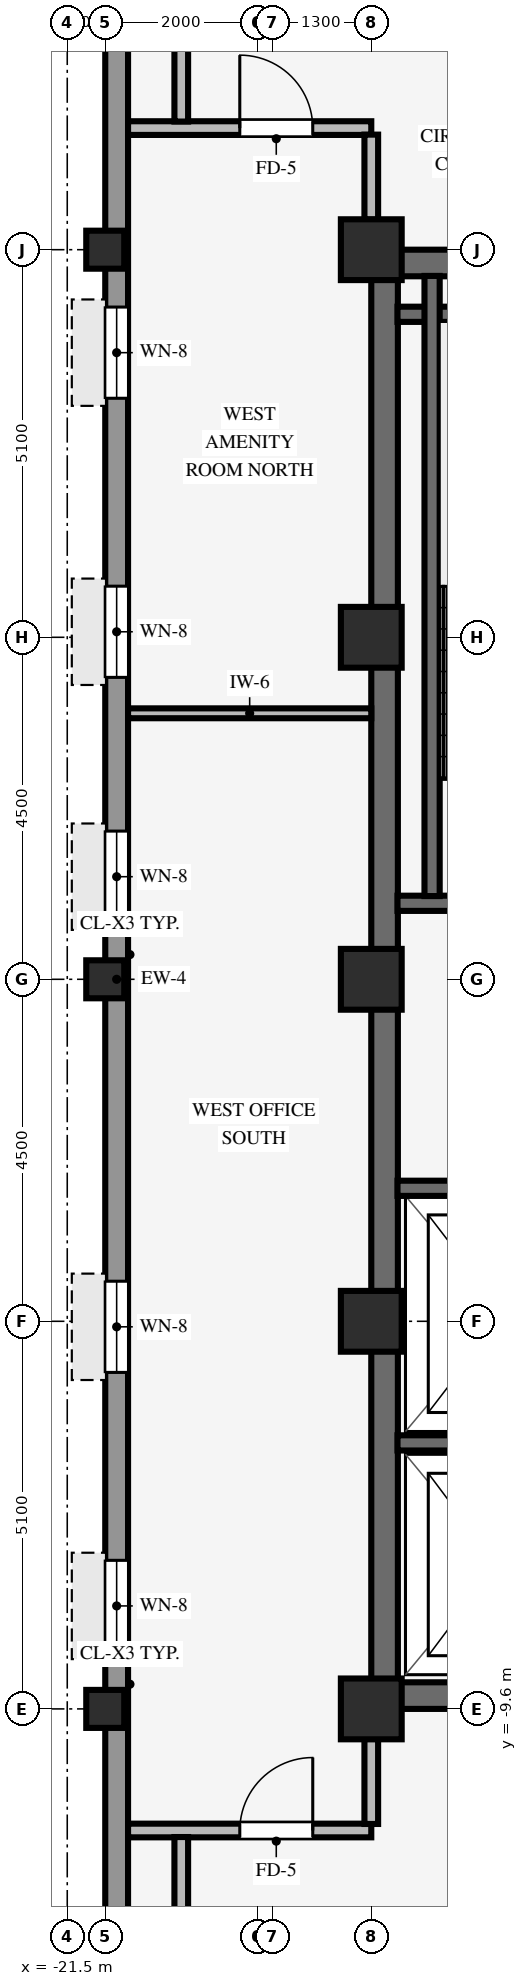
"""IFC4 building model, lengths in metres.
Left out: names, types, materials, properties, quantities, classifications, styles, units other than length and angle.
Written with IfcOpenShell. Run it as: python <this file> out.ifc"""

import sys

from ifc_helpers import new_model, si_unit, direction, frame, frame_2d, origin, origin_2d, place, context, subcontext, project, spatial, rectangle, hollow_rectangle, extrude, source, transform, mapped, element, fill, save


model = new_model("IFC4")
c1 = context("Model", 3, precision=1e-05, world=origin(), true_north=direction((0.0, 1.0)))
c2 = subcontext(c1, "Body", "Model", "MODEL_VIEW")
j1 = project(units=[si_unit("LENGTHUNIT", "METRE"), si_unit("PLANEANGLEUNIT", "RADIAN")], contexts=[c1])
p1 = place(None, origin())
s1 = spatial("IfcSite", under=j1, at=p1, CompositionType="ELEMENT")
p2 = place(p1, origin())
s2 = spatial("IfcBuilding", under=s1, at=p2, CompositionType="ELEMENT")
p3 = place(p2, frame((0.0, 0.0, 261.6)))
s3 = spatial("IfcBuildingStorey", under=s2, at=p3, CompositionType="ELEMENT", Elevation=261.6)
for number, where, z_axis, x_axis in (
    (1, (-17.5, -9.425, 0.0), (0.0, 0.0, 1.0), (1.0, 0.0, 0.0)),
    (2, (-17.5, 9.425, 0.0), (0.0, 0.0, 1.0), (1.0, 0.0, 0.0)),
):
    element("IfcWall", number, at=place(p3, frame(where, z_axis=z_axis, x_axis=x_axis)), inside=s3, PredefinedType="SHEAR", context=c2, shape_type="SweptSolid", body=[
        extrude(rectangle(XDim=8.5, YDim=0.35, at=frame_2d((4.25, 0.0))), origin(), (0.0, 0.0, 1.0), 3.37),
    ])
p4 = place(p3, frame((-17.325, -9.255, 0.0), z_axis=(0.0, 0.0, 1.0), x_axis=(0.0, 1.0, 0.0)))
e3 = element("IfcWall", 3, at=p4, inside=s3, PredefinedType="SHEAR", context=c2, shape_type="SweptSolid", body=[
    extrude(rectangle(XDim=18.51, YDim=0.35, at=frame_2d((9.255, 0.0))), origin(), (0.0, 0.0, 1.0), 3.37),
])
for number, where, z_axis, x_axis in (
    (4, (-17.5, -9.6, 0.0), (0.0, 0.0, 1.0), (1.0, 0.0, 0.0)),
    (5, (-17.5, -4.5, 0.0), (0.0, 0.0, 1.0), (1.0, 0.0, 0.0)),
    (6, (-17.5, 4.5, 0.0), (0.0, 0.0, 1.0), (1.0, 0.0, 0.0)),
    (7, (-17.5, 9.6, 0.0), (0.0, 0.0, 1.0), (1.0, 0.0, 0.0)),
    (8, (-17.5, 0.0, 0.0), (0.0, 0.0, 1.0), (1.0, 0.0, 0.0)),
):
    element("IfcColumn", number, at=place(p3, frame(where, z_axis=z_axis, x_axis=x_axis)), inside=s3, PredefinedType="COLUMN", context=c2, shape_type="SweptSolid", body=[
        extrude(rectangle(XDim=0.8, YDim=0.8, at=origin_2d()), origin(), (0.0, 0.0, 1.0), 3.37),
    ])
for number, where, z_axis, x_axis in (
    (9, (-21.0, -9.6, 0.0), (0.0, 0.0, 1.0), (1.0, 0.0, 0.0)),
    (10, (-21.0, 0.0, 0.0), (0.0, 0.0, 1.0), (1.0, 0.0, 0.0)),
    (11, (-21.0, 9.6, 0.0), (0.0, 0.0, 1.0), (1.0, 0.0, 0.0)),
):
    element("IfcColumn", number, at=place(p3, frame(where, z_axis=z_axis, x_axis=x_axis)), inside=s3, PredefinedType="COLUMN", context=c2, shape_type="SweptSolid", body=[
        extrude(hollow_rectangle(XDim=0.5, YDim=0.5, WallThickness=0.032, InnerFilletRadius=0.032, OuterFilletRadius=0.064, at=origin_2d()), origin(), (0.0, 0.0, 1.0), 3.37),
    ])
p5 = place(p3, frame((-20.85, -17.004, 0.0), z_axis=(0.0, 0.0, 1.0), x_axis=(0.0, 1.0, 0.0)))
e12 = element("IfcWall", 12, at=p5, inside=s3, PredefinedType="STANDARD", context=c2, shape_type="SweptSolid", body=[
    extrude(rectangle(XDim=34.008, YDim=0.3, at=frame_2d((17.004, 0.0))), origin(), (0.0, 0.0, 1.0), 2.705),
])
p6 = place(p5, frame((1.786, 0.0, 0.8)))
e13 = element("IfcOpeningElement", 13, at=p6, cuts=e12, PredefinedType="OPENING", context=c2, shape_type="SweptSolid", body=[
    extrude(rectangle(XDim=1.2, YDim=1.48, at=frame_2d((0.6, 0.74))), frame((0.0, 0.16, 0.0), z_axis=(0.0, -1.0, 0.0), x_axis=(1.0, 0.0, 0.0)), (0.0, 0.0, 1.0), 0.32),
])
p7 = place(p5, frame((8.159, 0.0, 0.8)))
e14 = element("IfcOpeningElement", 14, at=p7, cuts=e12, PredefinedType="OPENING", context=c2, shape_type="SweptSolid", body=[
    extrude(rectangle(XDim=1.2, YDim=1.48, at=frame_2d((0.6, 0.74))), frame((0.0, 0.16, 0.0), z_axis=(0.0, -1.0, 0.0), x_axis=(1.0, 0.0, 0.0)), (0.0, 0.0, 1.0), 0.32),
])
p8 = place(p5, frame((11.831, 0.0, 0.8)))
e15 = element("IfcOpeningElement", 15, at=p8, cuts=e12, PredefinedType="OPENING", context=c2, shape_type="SweptSolid", body=[
    extrude(rectangle(XDim=1.2, YDim=1.48, at=frame_2d((0.6, 0.74))), frame((0.0, 0.16, 0.0), z_axis=(0.0, -1.0, 0.0), x_axis=(1.0, 0.0, 0.0)), (0.0, 0.0, 1.0), 0.32),
])
p9 = place(p5, frame((17.754, 0.0, 0.8)))
e16 = element("IfcOpeningElement", 16, at=p9, cuts=e12, PredefinedType="OPENING", context=c2, shape_type="SweptSolid", body=[
    extrude(rectangle(XDim=1.2, YDim=1.48, at=frame_2d((0.6, 0.74))), frame((0.0, 0.16, 0.0), z_axis=(0.0, -1.0, 0.0), x_axis=(1.0, 0.0, 0.0)), (0.0, 0.0, 1.0), 0.32),
])
p10 = place(p5, frame((20.977, 0.0, 0.8)))
e17 = element("IfcOpeningElement", 17, at=p10, cuts=e12, PredefinedType="OPENING", context=c2, shape_type="SweptSolid", body=[
    extrude(rectangle(XDim=1.2, YDim=1.48, at=frame_2d((0.6, 0.74))), frame((0.0, 0.16, 0.0), z_axis=(0.0, -1.0, 0.0), x_axis=(1.0, 0.0, 0.0)), (0.0, 0.0, 1.0), 0.32),
])
p11 = place(p5, frame((24.649, 0.0, 0.8)))
e18 = element("IfcOpeningElement", 18, at=p11, cuts=e12, PredefinedType="OPENING", context=c2, shape_type="SweptSolid", body=[
    extrude(rectangle(XDim=1.2, YDim=1.48, at=frame_2d((0.6, 0.74))), frame((0.0, 0.16, 0.0), z_axis=(0.0, -1.0, 0.0), x_axis=(1.0, 0.0, 0.0)), (0.0, 0.0, 1.0), 0.32),
])
p12 = place(p5, frame((31.022, 0.0, 0.8)))
e19 = element("IfcOpeningElement", 19, at=p12, cuts=e12, PredefinedType="OPENING", context=c2, shape_type="SweptSolid", body=[
    extrude(rectangle(XDim=1.2, YDim=1.48, at=frame_2d((0.6, 0.74))), frame((0.0, 0.16, 0.0), z_axis=(0.0, -1.0, 0.0), x_axis=(1.0, 0.0, 0.0)), (0.0, 0.0, 1.0), 0.32),
])
for number, where, z_axis, x_axis in (
    (20, (-17.155, 1.0, 0.0), (0.0, 0.0, 1.0), (1.0, 0.0, 0.0)),
    (21, (-17.155, 8.75, 0.0), (0.0, 0.0, 1.0), (1.0, 0.0, 0.0)),
):
    element("IfcWall", number, at=place(p3, frame(where, z_axis=z_axis, x_axis=x_axis)), inside=s3, PredefinedType="SHEAR", context=c2, shape_type="SweptSolid", body=[
        extrude(rectangle(XDim=3.62, YDim=0.2, at=frame_2d((1.81, 0.0))), origin(), (0.0, 0.0, 1.0), 3.37),
    ])
p13 = place(p3, frame((-16.7, 1.095, 0.0), z_axis=(0.0, 0.0, 1.0), x_axis=(0.0, 1.0, 0.0)))
e22 = element("IfcWall", 22, at=p13, inside=s3, PredefinedType="SHEAR", context=c2, shape_type="SweptSolid", body=[
    extrude(rectangle(XDim=8.16, YDim=0.2, at=frame_2d((4.08, 0.0))), origin(), (0.0, 0.0, 1.0), 3.37),
])
p14 = place(p3, frame((-17.155, -6.1, 0.0), z_axis=(0.0, 0.0, 1.0), x_axis=(1.0, 0.0, 0.0)))
e23 = element("IfcWall", 23, at=p14, inside=s3, PredefinedType="SHEAR", context=c2, shape_type="SweptSolid", body=[
    extrude(rectangle(XDim=2.905, YDim=0.2, at=frame_2d((1.453, 0.0))), origin(), (0.0, 0.0, 1.0), 3.37),
])
p15 = place(p3, frame((-17.155, -2.75, 0.0), z_axis=(0.0, 0.0, 1.0), x_axis=(1.0, 0.0, 0.0)))
e24 = element("IfcWall", 24, at=p15, inside=s3, PredefinedType="SHEAR", context=c2, shape_type="SweptSolid", body=[
    extrude(rectangle(XDim=2.71, YDim=0.2, at=frame_2d((1.355, 0.0))), origin(), (0.0, 0.0, 1.0), 3.37),
])
p16 = place(p3, frame((-20.7, -11.2, 0.0), z_axis=(0.0, 0.0, 1.0), x_axis=(1.0, 0.0, 0.0)))
e25 = element("IfcWall", 25, at=p16, inside=s3, PredefinedType="PARTITIONING", context=c2, shape_type="SweptSolid", body=[
    extrude(rectangle(XDim=3.2, YDim=0.18, at=frame_2d((1.6, 0.0))), origin(), (0.0, 0.0, 1.0), 3.36),
])
p17 = place(p16, frame((1.47, 0.0, 0.0)))
e26 = element("IfcOpeningElement", 26, at=p17, cuts=e25, PredefinedType="OPENING", context=c2, shape_type="SweptSolid", body=[
    extrude(rectangle(XDim=0.96, YDim=2.1, at=frame_2d((0.48, 1.05))), frame((0.0, 0.1, 0.0), z_axis=(0.0, -1.0, 0.0), x_axis=(1.0, 0.0, 0.0)), (0.0, 0.0, 1.0), 0.2),
])
p18 = place(p3, frame((-20.7, 3.5, 0.0), z_axis=(0.0, 0.0, 1.0), x_axis=(1.0, 0.0, 0.0)))
e27 = element("IfcWall", 27, at=p18, inside=s3, PredefinedType="PARTITIONING", context=c2, shape_type="SweptSolid", body=[
    extrude(rectangle(XDim=3.2, YDim=0.13, at=frame_2d((1.6, 0.0))), origin(), (0.0, 0.0, 1.0), 3.36),
])
p19 = place(p3, frame((-20.7, 11.2, 0.0), z_axis=(0.0, 0.0, 1.0), x_axis=(1.0, 0.0, 0.0)))
e28 = element("IfcWall", 28, at=p19, inside=s3, PredefinedType="PARTITIONING", context=c2, shape_type="SweptSolid", body=[
    extrude(rectangle(XDim=3.2, YDim=0.18, at=frame_2d((1.6, 0.0))), origin(), (0.0, 0.0, 1.0), 3.36),
])
p20 = place(p19, frame((1.47, 0.0, 0.0)))
e29 = element("IfcOpeningElement", 29, at=p20, cuts=e28, PredefinedType="OPENING", context=c2, shape_type="SweptSolid", body=[
    extrude(rectangle(XDim=0.96, YDim=2.1, at=frame_2d((0.48, 1.05))), frame((0.0, 0.1, 0.0), z_axis=(0.0, -1.0, 0.0), x_axis=(1.0, 0.0, 0.0)), (0.0, 0.0, 1.0), 0.2),
])
for number, where, z_axis, x_axis in (
    (30, (-20.0, -13.514, 0.0), (0.0, 0.0, 1.0), (0.0, 1.0, 0.0)),
    (31, (-20.0, 11.286, 0.0), (0.0, 0.0, 1.0), (0.0, 1.0, 0.0)),
):
    element("IfcWall", number, at=place(p3, frame(where, z_axis=z_axis, x_axis=x_axis)), inside=s3, PredefinedType="PARTITIONING", context=c2, shape_type="SweptSolid", body=[
        extrude(rectangle(XDim=2.228, YDim=0.18, at=frame_2d((1.114, 0.0))), origin(), (0.0, 0.0, 1.0), 3.36),
    ])
for number, where, z_axis, x_axis in (
    (32, (-17.5, -11.114, 0.0), (0.0, 0.0, 1.0), (0.0, 1.0, 0.0)),
    (33, (-17.5, 9.996, 0.0), (0.0, 0.0, 1.0), (0.0, 1.0, 0.0)),
):
    element("IfcWall", number, at=place(p3, frame(where, z_axis=z_axis, x_axis=x_axis)), inside=s3, PredefinedType="PARTITIONING", context=c2, shape_type="SweptSolid", body=[
        extrude(rectangle(XDim=1.118, YDim=0.18, at=frame_2d((0.559, 0.0))), origin(), (0.0, 0.0, 1.0), 2.892),
    ])
m1 = source(origin(), c2, "Body", "SweptSolid", [
    extrude(rectangle(XDim=1.2, YDim=1.48, at=frame_2d((0.6, 0.74))), frame((0.0, 0.03, 0.0), z_axis=(0.0, -1.0, 0.0), x_axis=(1.0, 0.0, 0.0)), (0.0, 0.0, 1.0), 0.06),
])
p21 = place(p7, origin())
e34 = element("IfcWindow", 34, at=p21, inside=s3, PartitioningType="SINGLE_PANEL", PredefinedType="WINDOW", context=c2, shape_type="MappedRepresentation", body=[
    mapped(m1, transform((0.0, 0.0, 0.0), scale=1.0)),
])
fill(e14, e34)
p22 = place(p8, origin())
e35 = element("IfcWindow", 35, at=p22, inside=s3, PartitioningType="SINGLE_PANEL", PredefinedType="WINDOW", context=c2, shape_type="MappedRepresentation", body=[
    mapped(m1, transform((0.0, 0.0, 0.0), scale=1.0)),
])
fill(e15, e35)
p23 = place(p9, origin())
e36 = element("IfcWindow", 36, at=p23, inside=s3, PartitioningType="SINGLE_PANEL", PredefinedType="WINDOW", context=c2, shape_type="MappedRepresentation", body=[
    mapped(m1, transform((0.0, 0.0, 0.0), scale=1.0)),
])
fill(e16, e36)
p24 = place(p10, origin())
e37 = element("IfcWindow", 37, at=p24, inside=s3, PartitioningType="SINGLE_PANEL", PredefinedType="WINDOW", context=c2, shape_type="MappedRepresentation", body=[
    mapped(m1, transform((0.0, 0.0, 0.0), scale=1.0)),
])
fill(e17, e37)
p25 = place(p11, origin())
e38 = element("IfcWindow", 38, at=p25, inside=s3, PartitioningType="SINGLE_PANEL", PredefinedType="WINDOW", context=c2, shape_type="MappedRepresentation", body=[
    mapped(m1, transform((0.0, 0.0, 0.0), scale=1.0)),
])
fill(e18, e38)
m2 = source(origin(), c2, "Body", "SweptSolid", [
    extrude(rectangle(XDim=0.96, YDim=2.1, at=frame_2d((0.48, 1.05))), frame((0.0, 0.025, 0.0), z_axis=(0.0, -1.0, 0.0), x_axis=(1.0, 0.0, 0.0)), (0.0, 0.0, 1.0), 0.05),
])
p26 = place(p17, origin())
e39 = element("IfcDoor", 39, at=p26, inside=s3, OperationType="SINGLE_SWING_RIGHT", PredefinedType="DOOR", context=c2, shape_type="MappedRepresentation", body=[
    mapped(m2, transform((0.0, 0.0, 0.0), scale=1.0)),
])
fill(e26, e39)
p27 = place(p20, origin())
e40 = element("IfcDoor", 40, at=p27, inside=s3, OperationType="SINGLE_SWING_LEFT", PredefinedType="DOOR", context=c2, shape_type="MappedRepresentation", body=[
    mapped(m2, transform((0.0, 0.0, 0.0), scale=1.0)),
])
fill(e29, e40)
save(model, sys.argv[1])
